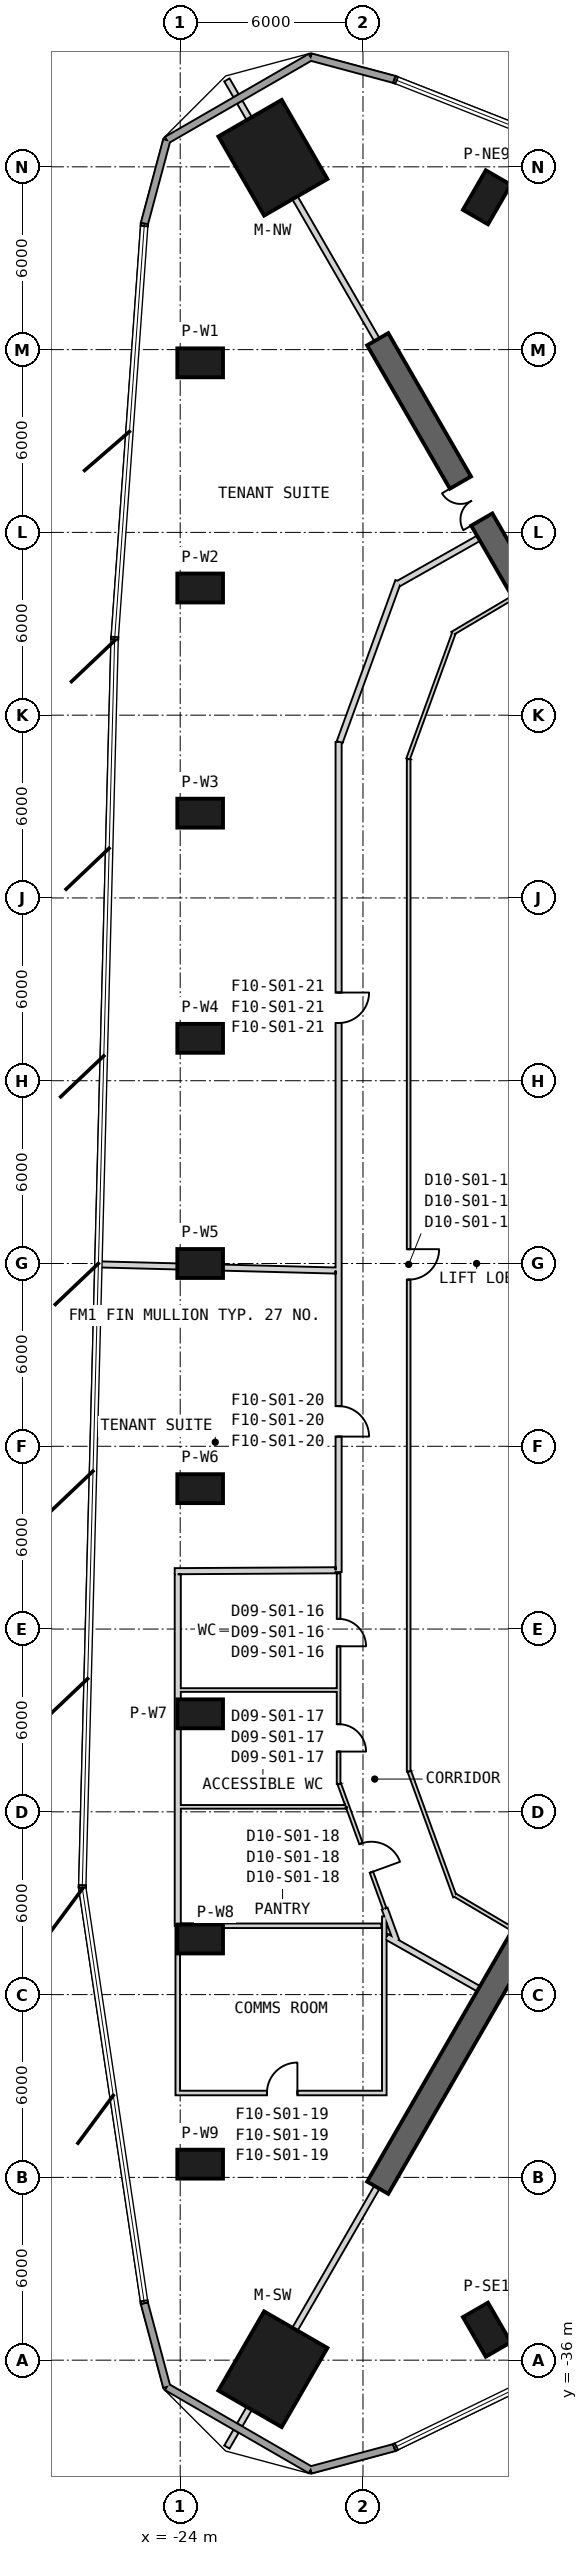
"""IFC4 building model, lengths in metres.
Left out: names, types, materials, properties, quantities, classifications, styles, units other than length and angle.
Written with IfcOpenShell. Run it as: python <this file> out.ifc"""

import sys

from ifc_helpers import new_model, si_unit, direction, frame, frame_2d, origin, origin_2d, place, context, subcontext, project, spatial, rectangle, extrude, element, fill, save


model = new_model("IFC4")
c1 = context("Model", 3, precision=1e-05, world=origin(), true_north=direction((0.0, 1.0)))
c2 = subcontext(c1, "Body", "Model", "MODEL_VIEW")
j1 = project(units=[si_unit("LENGTHUNIT", "METRE"), si_unit("PLANEANGLEUNIT", "RADIAN")], contexts=[c1])
p1 = place(None, origin())
s1 = spatial("IfcSite", under=j1, at=p1, CompositionType="ELEMENT")
p2 = place(p1, origin())
s2 = spatial("IfcBuilding", under=s1, at=p2, CompositionType="ELEMENT")
p3 = place(p2, frame((0.0, 0.0, 57.8)))
s3 = spatial("IfcBuildingStorey", under=s2, at=p3, CompositionType="ELEMENT", Elevation=57.8)
for number, where, z_axis, x_axis in (
    (1, (-20.957, 36.298, 0.0), (0.0, 0.0, 1.0), (-0.5, 0.866, 0.0)),
    (2, (-20.957, -36.298, 0.0), (0.0, 0.0, 1.0), (-0.5, -0.866, 0.0)),
):
    element("IfcColumn", number, at=place(p3, frame(where, z_axis=z_axis, x_axis=x_axis)), inside=s3, PredefinedType="COLUMN", context=c2, shape_type="SweptSolid", body=[
        extrude(rectangle(XDim=3.0, YDim=2.4, at=origin_2d()), origin(), (0.0, 0.0, 1.0), 4.1),
    ])
for number, where, z_axis, x_axis in (
    (3, (-23.344, 29.566, 0.0), (0.0, 0.0, 1.0), (-1.0, 0.0, 0.0)),
    (4, (-23.344, 22.174, 0.0), (0.0, 0.0, 1.0), (-1.0, 0.0, 0.0)),
    (5, (-23.344, 14.783, 0.0), (0.0, 0.0, 1.0), (-1.0, 0.0, 0.0)),
    (6, (-23.344, 7.391, 0.0), (0.0, 0.0, 1.0), (-1.0, 0.0, 0.0)),
    (7, (-23.344, 0.0, 0.0), (0.0, 0.0, 1.0), (-1.0, 0.0, 0.0)),
    (8, (-23.344, -7.391, 0.0), (0.0, 0.0, 1.0), (-1.0, 0.0, 0.0)),
    (9, (-23.344, -14.783, 0.0), (0.0, 0.0, 1.0), (-1.0, 0.0, 0.0)),
    (10, (-23.344, -22.174, 0.0), (0.0, 0.0, 1.0), (-1.0, 0.0, 0.0)),
    (11, (-23.344, -29.566, 0.0), (0.0, 0.0, 1.0), (-1.0, 0.0, 0.0)),
    (12, (-13.933, 35.0, 0.0), (0.0, 0.0, 1.0), (0.5, 0.866, 0.0)),
    (13, (-13.933, -35.0, 0.0), (0.0, 0.0, 1.0), (0.5, -0.866, 0.0)),
):
    element("IfcColumn", number, at=place(p3, frame(where, z_axis=z_axis, x_axis=x_axis)), inside=s3, PredefinedType="COLUMN", context=c2, shape_type="SweptSolid", body=[
        extrude(rectangle(XDim=1.5, YDim=0.95, at=origin_2d()), origin(), (0.0, 0.0, 1.0), 4.1),
    ])
p4 = place(p3, frame((-10.575, 18.316, 0.0), z_axis=(0.0, 0.0, 1.0), x_axis=(-0.500001010139, 0.866024820579, 0.0)))
e14 = element("IfcWall", 14, at=p4, inside=s3, PredefinedType="SHEAR", context=c2, shape_type="SweptSolid", body=[
    extrude(rectangle(XDim=13.884, YDim=0.8, at=frame_2d((6.942, 0.0))), origin(), (0.0, 0.0, 1.0), 4.1),
])
p5 = place(p4, frame((7.05, 0.0, 0.0)))
e15 = element("IfcOpeningElement", 15, at=p5, cuts=e14, PredefinedType="OPENING", context=c2, shape_type="SweptSolid", body=[
    extrude(rectangle(XDim=1.4, YDim=2.4, at=frame_2d((0.7, 1.2))), frame((0.0, 0.41, 0.0), z_axis=(0.0, -1.0, 0.0), x_axis=(1.0, 0.0, 0.0)), (0.0, 0.0, 1.0), 0.82),
])
p6 = place(p3, frame((-10.575, -18.316, 0.0), z_axis=(0.0, 0.0, 1.0), x_axis=(-0.500001010139, -0.866024820579, 0.0)))
e16 = element("IfcWall", 16, at=p6, inside=s3, PredefinedType="SHEAR", context=c2, shape_type="SweptSolid", body=[
    extrude(rectangle(XDim=13.884, YDim=0.8, at=frame_2d((6.942, 0.0))), origin(), (0.0, 0.0, 1.0), 4.1),
])
p7 = place(p6, frame((1.2, 0.0, 0.0)))
e17 = element("IfcOpeningElement", 17, at=p7, cuts=e16, PredefinedType="OPENING", context=c2, shape_type="SweptSolid", body=[
    extrude(rectangle(XDim=1.4, YDim=2.4, at=frame_2d((0.7, 1.2))), frame((0.0, 0.41, 0.0), z_axis=(0.0, -1.0, 0.0), x_axis=(1.0, 0.0, 0.0)), (0.0, 0.0, 1.0), 0.82),
])
p8 = place(p3, frame((-16.969, 38.869, 0.0), z_axis=(0.0, 0.0, 1.0), x_axis=(-0.965929678743, 0.258804667121, 0.0)))
e18 = element("IfcWall", 18, at=p8, inside=s3, PredefinedType="SOLIDWALL", context=c2, shape_type="SweptSolid", body=[
    extrude(rectangle(XDim=2.847, YDim=0.24, at=frame_2d((1.423, 0.0))), origin(), (0.0, 0.0, 1.0), 3.8),
])
p9 = place(p3, frame((-19.719, 39.606, 0.0), z_axis=(0.0, 0.0, 1.0), x_axis=(-0.866029712004, -0.499992537871, 0.0)))
e19 = element("IfcWall", 19, at=p9, inside=s3, PredefinedType="SOLIDWALL", context=c2, shape_type="SweptSolid", body=[
    extrude(rectangle(XDim=5.451, YDim=0.24, at=frame_2d((2.726, 0.0))), origin(), (0.0, 0.0, 1.0), 3.8),
])
p10 = place(p3, frame((-24.44, 36.88, 0.0), z_axis=(0.0, 0.0, 1.0), x_axis=(-0.258870602714, -0.965912009994, 0.0)))
e20 = element("IfcWall", 20, at=p10, inside=s3, PredefinedType="SOLIDWALL", context=c2, shape_type="SweptSolid", body=[
    extrude(rectangle(XDim=2.843, YDim=0.24, at=frame_2d((1.421, 0.0))), origin(), (0.0, 0.0, 1.0), 3.8),
])
p11 = place(p3, frame((-25.177, -34.13, 0.0), z_axis=(0.0, 0.0, 1.0), x_axis=(0.258783231513, -0.9659354218, 0.0)))
e21 = element("IfcWall", 21, at=p11, inside=s3, PredefinedType="SOLIDWALL", context=c2, shape_type="SweptSolid", body=[
    extrude(rectangle(XDim=2.847, YDim=0.24, at=frame_2d((1.424, 0.0))), origin(), (0.0, 0.0, 1.0), 3.8),
])
p12 = place(p3, frame((-24.44, -36.88, 0.0), z_axis=(0.0, 0.0, 1.0), x_axis=(0.866029712004, -0.499992537871, 0.0)))
e22 = element("IfcWall", 22, at=p12, inside=s3, PredefinedType="SOLIDWALL", context=c2, shape_type="SweptSolid", body=[
    extrude(rectangle(XDim=5.451, YDim=0.24, at=frame_2d((2.726, 0.0))), origin(), (0.0, 0.0, 1.0), 3.8),
])
p13 = place(p3, frame((-19.719, -39.606, 0.0), z_axis=(0.0, 0.0, 1.0), x_axis=(0.965933483463, 0.258790466448, 0.0)))
e23 = element("IfcWall", 23, at=p13, inside=s3, PredefinedType="SOLIDWALL", context=c2, shape_type="SweptSolid", body=[
    extrude(rectangle(XDim=2.843, YDim=0.24, at=frame_2d((1.421, 0.0))), origin(), (0.0, 0.0, 1.0), 3.8),
])
p14 = place(p3, frame((-13.082, 21.859, 0.0), z_axis=(0.0, 0.0, 1.0), x_axis=(-0.860286384661, -0.509811079095, 0.0)))
e24 = element("IfcWall", 24, at=p14, inside=s3, PredefinedType="PARTITIONING", context=c2, shape_type="SweptSolid", body=[
    extrude(rectangle(XDim=2.311, YDim=0.12, at=frame_2d((1.155, 0.0))), origin(), (0.0, 0.0, 1.0), 3.8),
])
p15 = place(p3, frame((-15.017, 20.692, 0.0), z_axis=(0.0, 0.0, 1.0), x_axis=(-0.342028368186, -0.939689627141, 0.0)))
e25 = element("IfcWall", 25, at=p15, inside=s3, PredefinedType="PARTITIONING", context=c2, shape_type="SweptSolid", body=[
    extrude(rectangle(XDim=4.397, YDim=0.12, at=frame_2d((2.198, 0.0))), origin(), (0.0, 0.0, 1.0), 2.88),
])
p16 = place(p3, frame((-16.5, 16.557, 0.0), z_axis=(0.0, 0.0, 1.0), x_axis=(0.0, -1.0, 0.0)))
e26 = element("IfcWall", 26, at=p16, inside=s3, PredefinedType="PARTITIONING", context=c2, shape_type="SweptSolid", body=[
    extrude(rectangle(XDim=33.234, YDim=0.12, at=frame_2d((16.617, 0.0))), origin(), (0.0, 0.0, 1.0), 2.98),
])
p17 = place(p16, frame((16.087, 0.0, 0.0)))
e27 = element("IfcOpeningElement", 27, at=p17, cuts=e26, PredefinedType="OPENING", context=c2, shape_type="SweptSolid", body=[
    extrude(rectangle(XDim=1.0, YDim=2.1, at=frame_2d((0.5, 1.05))), frame((0.0, 0.07, 0.0), z_axis=(0.0, -1.0, 0.0), x_axis=(1.0, 0.0, 0.0)), (0.0, 0.0, 1.0), 0.14),
])
p18 = place(p3, frame((-16.479, -16.673, 0.0), z_axis=(0.0, 0.0, 1.0), x_axis=(0.342025144217, -0.939690800595, 0.0)))
e28 = element("IfcWall", 28, at=p18, inside=s3, PredefinedType="PARTITIONING", context=c2, shape_type="SweptSolid", body=[
    extrude(rectangle(XDim=4.378, YDim=0.12, at=frame_2d((2.189, 0.0))), origin(), (0.0, 0.0, 1.0), 2.88),
])
p19 = place(p3, frame((-14.983, -20.732, 0.0), z_axis=(0.0, 0.0, 1.0), x_axis=(0.860268204019, -0.509841756973, 0.0)))
e29 = element("IfcWall", 29, at=p19, inside=s3, PredefinedType="PARTITIONING", context=c2, shape_type="SweptSolid", body=[
    extrude(rectangle(XDim=2.21, YDim=0.12, at=frame_2d((1.105, 0.0))), origin(), (0.0, 0.0, 1.0), 3.8),
])
p20 = place(p3, frame((-18.8, 17.122, 0.0), z_axis=(0.0, 0.0, 1.0), x_axis=(0.0, -1.0, 0.0)))
e30 = element("IfcWall", 30, at=p20, inside=s3, PredefinedType="PARTITIONING", context=c2, shape_type="SweptSolid", body=[
    extrude(rectangle(XDim=27.252, YDim=0.2, at=frame_2d((13.626, 0.0))), origin(), (0.0, 0.0, 1.0), 3.08),
])
p21 = place(p20, frame((21.804, 0.0, 0.0)))
e31 = element("IfcOpeningElement", 31, at=p21, cuts=e30, PredefinedType="OPENING", context=c2, shape_type="SweptSolid", body=[
    extrude(rectangle(XDim=1.0, YDim=2.1, at=frame_2d((0.5, 1.05))), frame((0.0, 0.11, 0.0), z_axis=(0.0, -1.0, 0.0), x_axis=(1.0, 0.0, 0.0)), (0.0, 0.0, 1.0), 0.22),
])
p22 = place(p20, frame((8.228, 0.0, 0.0)))
e32 = element("IfcOpeningElement", 32, at=p22, cuts=e30, PredefinedType="OPENING", context=c2, shape_type="SweptSolid", body=[
    extrude(rectangle(XDim=1.0, YDim=2.1, at=frame_2d((0.5, 1.05))), frame((0.0, 0.11, 0.0), z_axis=(0.0, -1.0, 0.0), x_axis=(1.0, 0.0, 0.0)), (0.0, 0.0, 1.0), 0.22),
])
p23 = place(p3, frame((-17.225, -22.098, 0.0), z_axis=(0.0, 0.0, 1.0), x_axis=(0.870318902943, -0.492488585838, 0.0)))
e33 = element("IfcWall", 33, at=p23, inside=s3, PredefinedType="PARTITIONING", context=c2, shape_type="SweptSolid", body=[
    extrude(rectangle(XDim=3.469, YDim=0.2, at=frame_2d((1.734, 0.0))), origin(), (0.0, 0.0, 1.0), 2.88),
])
p24 = place(p3, frame((-17.288, -21.178, 0.0), z_axis=(0.0, 0.0, 1.0), x_axis=(0.342070628624, -0.939674244104, 0.0)))
e34 = element("IfcWall", 34, at=p24, inside=s3, PredefinedType="PARTITIONING", context=c2, shape_type="SweptSolid", body=[
    extrude(rectangle(XDim=1.137, YDim=0.2, at=frame_2d((0.568, 0.0))), origin(), (0.0, 0.0, 1.0), 2.88),
])
p25 = place(p3, frame((-16.842, 22.402, 0.0), z_axis=(0.0, 0.0, 1.0), x_axis=(-0.342049747763, -0.939681845124, 0.0)))
e35 = element("IfcWall", 35, at=p25, inside=s3, PredefinedType="PARTITIONING", context=c2, shape_type="SweptSolid", body=[
    extrude(rectangle(XDim=5.625, YDim=0.2, at=frame_2d((2.812, 0.0))), origin(), (0.0, 0.0, 1.0), 2.88),
])
p26 = place(p3, frame((-14.206, 23.806, 0.0), z_axis=(0.0, 0.0, 1.0), x_axis=(-0.87028621909, -0.492546339811, 0.0)))
e36 = element("IfcWall", 36, at=p26, inside=s3, PredefinedType="PARTITIONING", context=c2, shape_type="SweptSolid", body=[
    extrude(rectangle(XDim=3.026, YDim=0.2, at=frame_2d((1.513, 0.0))), origin(), (0.0, 0.0, 1.0), 3.8),
])
p27 = place(p3, frame((-18.8, -10.17, 0.0), z_axis=(0.0, 0.0, 1.0), x_axis=(0.0, -1.0, 0.0)))
e37 = element("IfcWall", 37, at=p27, inside=s3, PredefinedType="PARTITIONING", context=c2, shape_type="SweptSolid", body=[
    extrude(rectangle(XDim=6.913, YDim=0.12, at=frame_2d((3.456, 0.0))), origin(), (0.0, 0.0, 1.0), 3.08),
])
p28 = place(p27, frame((1.496, 0.0, 0.0)))
e38 = element("IfcOpeningElement", 38, at=p28, cuts=e37, PredefinedType="OPENING", context=c2, shape_type="SweptSolid", body=[
    extrude(rectangle(XDim=0.9, YDim=2.1, at=frame_2d((0.45, 1.05))), frame((0.0, 0.07, 0.0), z_axis=(0.0, -1.0, 0.0), x_axis=(1.0, 0.0, 0.0)), (0.0, 0.0, 1.0), 0.14),
])
p29 = place(p27, frame((4.952, 0.0, 0.0)))
e39 = element("IfcOpeningElement", 39, at=p29, cuts=e37, PredefinedType="OPENING", context=c2, shape_type="SweptSolid", body=[
    extrude(rectangle(XDim=0.9, YDim=2.1, at=frame_2d((0.45, 1.05))), frame((0.0, 0.07, 0.0), z_axis=(0.0, -1.0, 0.0), x_axis=(1.0, 0.0, 0.0)), (0.0, 0.0, 1.0), 0.14),
])
p30 = place(p3, frame((-18.78, -17.079, 0.0), z_axis=(0.0, 0.0, 1.0), x_axis=(0.342127231308, -0.939653637037, 0.0)))
e40 = element("IfcWall", 40, at=p30, inside=s3, PredefinedType="PARTITIONING", context=c2, shape_type="SweptSolid", body=[
    extrude(rectangle(XDim=0.816, YDim=0.12, at=frame_2d((0.408, 0.0))), origin(), (0.0, 0.0, 1.0), 2.98),
])
p31 = place(p3, frame((-18.5, -17.846, 0.0), z_axis=(0.0, 0.0, 1.0), x_axis=(0.342013954414, -0.939694873342, 0.0)))
e41 = element("IfcWall", 41, at=p31, inside=s3, PredefinedType="PARTITIONING", context=c2, shape_type="SweptSolid", body=[
    extrude(rectangle(XDim=3.546, YDim=0.12, at=frame_2d((1.773, 0.0))), origin(), (0.0, 0.0, 1.0), 3.8),
])
p32 = place(p31, frame((1.273, 0.0, 0.0)))
e42 = element("IfcOpeningElement", 42, at=p32, cuts=e41, PredefinedType="OPENING", context=c2, shape_type="SweptSolid", body=[
    extrude(rectangle(XDim=1.0, YDim=2.1, at=frame_2d((0.5, 1.05))), frame((0.0, 0.07, 0.0), z_axis=(0.0, -1.0, 0.0), x_axis=(1.0, 0.0, 0.0)), (0.0, 0.0, 1.0), 0.14),
])
p33 = place(p3, frame((-26.685, -0.029, 0.0), z_axis=(0.0, 0.0, 1.0), x_axis=(0.999664660835, -0.025895286789, 0.0)))
e43 = element("IfcWall", 43, at=p33, inside=s3, PredefinedType="PARTITIONING", context=c2, shape_type="SweptSolid", body=[
    extrude(rectangle(XDim=7.788, YDim=0.2, at=frame_2d((3.894, 0.0))), origin(), (0.0, 0.0, 1.0), 3.08),
])
p34 = place(p3, frame((-17.543, -30.325, 0.0), z_axis=(0.0, 0.0, 1.0), x_axis=(-0.500014458952, -0.866017055744, 0.0)))
e44 = element("IfcWall", 44, at=p34, inside=s3, PredefinedType="PARTITIONING", context=c2, shape_type="SweptSolid", body=[
    extrude(rectangle(XDim=5.38, YDim=0.2, at=frame_2d((2.69, 0.0))), origin(), (0.0, 0.0, 1.0), 3.37),
])
p35 = place(p3, frame((-21.733, -37.582, 0.0), z_axis=(0.0, 0.0, 1.0), x_axis=(-0.49966612908, -0.86621807846, 0.0)))
e45 = element("IfcWall", 45, at=p35, inside=s3, PredefinedType="PARTITIONING", context=c2, shape_type="SweptSolid", body=[
    extrude(rectangle(XDim=0.625, YDim=0.2, at=frame_2d((0.313, 0.0))), origin(), (0.0, 0.0, 1.0), 3.8),
])
p36 = place(p3, frame((-22.166, -38.332, 0.0), z_axis=(0.0, 0.0, 1.0), x_axis=(-0.499757541684, -0.866165341912, 0.0)))
e46 = element("IfcWall", 46, at=p36, inside=s3, PredefinedType="PARTITIONING", context=c2, shape_type="SweptSolid", body=[
    extrude(rectangle(XDim=0.602, YDim=0.2, at=frame_2d((0.301, 0.0))), origin(), (0.0, 0.0, 1.0), 3.8),
])
p37 = place(p3, frame((-18.9, -10.071, 0.0), z_axis=(0.0, 0.0, 1.0), x_axis=(-0.999983827501, -0.005687243297, 0.0)))
e47 = element("IfcWall", 47, at=p37, inside=s3, PredefinedType="PARTITIONING", context=c2, shape_type="SweptSolid", body=[
    extrude(rectangle(XDim=5.28, YDim=0.2, at=frame_2d((2.64, 0.0))), origin(), (0.0, 0.0, 1.0), 3.8),
])
p38 = place(p3, frame((-24.08, -21.733, 0.0), z_axis=(0.0, 0.0, 1.0), x_axis=(0.0, 1.0, 0.0)))
e48 = element("IfcWall", 48, at=p38, inside=s3, PredefinedType="PARTITIONING", context=c2, shape_type="SweptSolid", body=[
    extrude(rectangle(XDim=3.896, YDim=0.2, at=frame_2d((1.948, 0.0))), origin(), (0.0, 0.0, 1.0), 3.8),
])
p39 = place(p3, frame((-24.08, -17.837, 0.0), z_axis=(0.0, 0.0, 1.0), x_axis=(0.0, 1.0, 0.0)))
e49 = element("IfcWall", 49, at=p39, inside=s3, PredefinedType="PARTITIONING", context=c2, shape_type="SweptSolid", body=[
    extrude(rectangle(XDim=7.637, YDim=0.2, at=frame_2d((3.818, 0.0))), origin(), (0.0, 0.0, 1.0), 3.8),
])
p40 = place(p3, frame((-24.08, -27.305, 0.0), z_axis=(0.0, 0.0, 1.0), x_axis=(0.0, 1.0, 0.0)))
e50 = element("IfcWall", 50, at=p40, inside=s3, PredefinedType="PLUMBINGWALL", context=c2, shape_type="SweptSolid", body=[
    extrude(rectangle(XDim=5.572, YDim=0.15, at=frame_2d((2.786, 0.0))), origin(), (0.0, 0.0, 1.0), 3.8),
])
p41 = place(p3, frame((-24.005, -27.23, 0.0), z_axis=(0.0, 0.0, 1.0), x_axis=(1.0, 0.0, 0.0)))
e51 = element("IfcWall", 51, at=p41, inside=s3, PredefinedType="PLUMBINGWALL", context=c2, shape_type="SweptSolid", body=[
    extrude(rectangle(XDim=6.78, YDim=0.15, at=frame_2d((3.39, 0.0))), origin(), (0.0, 0.0, 1.0), 2.88),
])
p42 = place(p41, frame((2.853, 0.0, 0.0)))
e52 = element("IfcOpeningElement", 52, at=p42, cuts=e51, PredefinedType="OPENING", context=c2, shape_type="SweptSolid", body=[
    extrude(rectangle(XDim=1.0, YDim=2.1, at=frame_2d((0.5, 1.05))), frame((0.0, 0.085, 0.0), z_axis=(0.0, -1.0, 0.0), x_axis=(1.0, 0.0, 0.0)), (0.0, 0.0, 1.0), 0.17),
])
p43 = place(p3, frame((-17.3, -27.155, 0.0), z_axis=(0.0, 0.0, 1.0), x_axis=(0.0, 1.0, 0.0)))
e53 = element("IfcWall", 53, at=p43, inside=s3, PredefinedType="PLUMBINGWALL", context=c2, shape_type="SweptSolid", body=[
    extrude(rectangle(XDim=5.719, YDim=0.15, at=frame_2d((2.859, 0.0))), origin(), (0.0, 0.0, 1.0), 2.88),
])
p44 = place(p3, frame((-22.467, 38.854, 0.0), z_axis=(0.0, 0.0, 1.0), x_axis=(0.499757541684, -0.866165341912, 0.0)))
e54 = element("IfcWall", 54, at=p44, inside=s3, PredefinedType="PARTITIONING", context=c2, shape_type="SweptSolid", body=[
    extrude(rectangle(XDim=0.602, YDim=0.2, at=frame_2d((0.301, 0.0))), origin(), (0.0, 0.0, 1.0), 3.8),
])
p45 = place(p3, frame((-22.045, 38.124, 0.0), z_axis=(0.0, 0.0, 1.0), x_axis=(0.49966612908, -0.86621807846, 0.0)))
e55 = element("IfcWall", 55, at=p45, inside=s3, PredefinedType="PARTITIONING", context=c2, shape_type="SweptSolid", body=[
    extrude(rectangle(XDim=0.625, YDim=0.2, at=frame_2d((0.313, 0.0))), origin(), (0.0, 0.0, 1.0), 3.8),
])
p46 = place(p3, frame((-20.233, 34.984, 0.0), z_axis=(0.0, 0.0, 1.0), x_axis=(0.500014458952, -0.866017055744, 0.0)))
e56 = element("IfcWall", 56, at=p46, inside=s3, PredefinedType="PARTITIONING", context=c2, shape_type="SweptSolid", body=[
    extrude(rectangle(XDim=5.38, YDim=0.2, at=frame_2d((2.69, 0.0))), origin(), (0.0, 0.0, 1.0), 3.37),
])
p47 = place(p3, frame((-23.98, -14.002, 0.0), z_axis=(0.0, 0.0, 1.0), x_axis=(1.0, 0.0, 0.0)))
e57 = element("IfcWall", 57, at=p47, inside=s3, PredefinedType="PARTITIONING", context=c2, shape_type="SweptSolid", body=[
    extrude(rectangle(XDim=5.12, YDim=0.12, at=frame_2d((2.56, 0.0))), origin(), (0.0, 0.0, 1.0), 3.08),
])
p48 = place(p3, frame((-18.567, -17.837, 0.0), z_axis=(0.0, 0.0, 1.0), x_axis=(-1.0, 0.0, 0.0)))
e58 = element("IfcWall", 58, at=p48, inside=s3, PredefinedType="PARTITIONING", context=c2, shape_type="SweptSolid", body=[
    extrude(rectangle(XDim=5.413, YDim=0.12, at=frame_2d((2.706, 0.0))), origin(), (0.0, 0.0, 1.0), 2.98),
])
p49 = place(p3, frame((-17.4, -21.741, 0.0), z_axis=(0.0, 0.0, 1.0), x_axis=(-1.0, 0.0, 0.0)))
e59 = element("IfcWall", 59, at=p49, inside=s3, PredefinedType="PLUMBINGWALL", context=c2, shape_type="SweptSolid", body=[
    extrude(rectangle(XDim=6.58, YDim=0.15, at=frame_2d((3.29, 0.0))), origin(), (0.0, 0.0, 1.0), 2.98),
])
p50 = place(p17, origin())
e60 = element("IfcDoor", 60, at=p50, inside=s3, OperationType="SINGLE_SWING_LEFT", PredefinedType="NOTDEFINED", context=c2, shape_type="SweptSolid", body=[
    extrude(rectangle(XDim=1.0, YDim=2.1, at=frame_2d((0.5, 1.05))), frame((0.0, 0.025, 0.0), z_axis=(0.0, -1.0, 0.0), x_axis=(1.0, 0.0, 0.0)), (0.0, 0.0, 1.0), 0.05),
])
fill(e27, e60)
p51 = place(p28, origin())
e61 = element("IfcDoor", 61, at=p51, inside=s3, OperationType="SINGLE_SWING_LEFT", PredefinedType="NOTDEFINED", context=c2, shape_type="SweptSolid", body=[
    extrude(rectangle(XDim=0.9, YDim=2.1, at=frame_2d((0.45, 1.05))), frame((0.0, 0.025, 0.0), z_axis=(0.0, -1.0, 0.0), x_axis=(1.0, 0.0, 0.0)), (0.0, 0.0, 1.0), 0.05),
])
fill(e38, e61)
p52 = place(p29, origin())
e62 = element("IfcDoor", 62, at=p52, inside=s3, OperationType="SINGLE_SWING_LEFT", PredefinedType="NOTDEFINED", context=c2, shape_type="SweptSolid", body=[
    extrude(rectangle(XDim=0.9, YDim=2.1, at=frame_2d((0.45, 1.05))), frame((0.0, 0.025, 0.0), z_axis=(0.0, -1.0, 0.0), x_axis=(1.0, 0.0, 0.0)), (0.0, 0.0, 1.0), 0.05),
])
fill(e39, e62)
p53 = place(p32, origin())
e63 = element("IfcDoor", 63, at=p53, inside=s3, OperationType="SINGLE_SWING_LEFT", PredefinedType="NOTDEFINED", context=c2, shape_type="SweptSolid", body=[
    extrude(rectangle(XDim=1.0, YDim=2.1, at=frame_2d((0.5, 1.05))), frame((0.0, 0.025, 0.0), z_axis=(0.0, -1.0, 0.0), x_axis=(1.0, 0.0, 0.0)), (0.0, 0.0, 1.0), 0.05),
])
fill(e42, e63)
p54 = place(p42, origin())
e64 = element("IfcDoor", 64, at=p54, inside=s3, OperationType="SINGLE_SWING_LEFT", PredefinedType="USERDEFINED", context=c2, shape_type="SweptSolid", body=[
    extrude(rectangle(XDim=1.0, YDim=2.1, at=frame_2d((0.5, 1.05))), frame((0.0, 0.025, 0.0), z_axis=(0.0, -1.0, 0.0), x_axis=(1.0, 0.0, 0.0)), (0.0, 0.0, 1.0), 0.05),
])
fill(e52, e64)
p55 = place(p21, origin())
e65 = element("IfcDoor", 65, at=p55, inside=s3, OperationType="SINGLE_SWING_LEFT", PredefinedType="USERDEFINED", context=c2, shape_type="SweptSolid", body=[
    extrude(rectangle(XDim=1.0, YDim=2.1, at=frame_2d((0.5, 1.05))), frame((0.0, 0.025, 0.0), z_axis=(0.0, -1.0, 0.0), x_axis=(1.0, 0.0, 0.0)), (0.0, 0.0, 1.0), 0.05),
])
fill(e31, e65)
p56 = place(p22, origin())
e66 = element("IfcDoor", 66, at=p56, inside=s3, OperationType="SINGLE_SWING_RIGHT", PredefinedType="USERDEFINED", context=c2, shape_type="SweptSolid", body=[
    extrude(rectangle(XDim=1.0, YDim=2.1, at=frame_2d((0.5, 1.05))), frame((0.0, 0.025, 0.0), z_axis=(0.0, -1.0, 0.0), x_axis=(1.0, 0.0, 0.0)), (0.0, 0.0, 1.0), 0.05),
])
fill(e32, e66)
p57 = place(p5, origin())
e67 = element("IfcDoor", 67, at=p57, inside=s3, OperationType="DOUBLE_DOOR_SINGLE_SWING", PredefinedType="NOTDEFINED", context=c2, shape_type="SweptSolid", body=[
    extrude(rectangle(XDim=1.4, YDim=2.4, at=frame_2d((0.7, 1.2))), frame((0.0, 0.025, 0.0), z_axis=(0.0, -1.0, 0.0), x_axis=(1.0, 0.0, 0.0)), (0.0, 0.0, 1.0), 0.05),
])
fill(e15, e67)
save(model, sys.argv[1])
